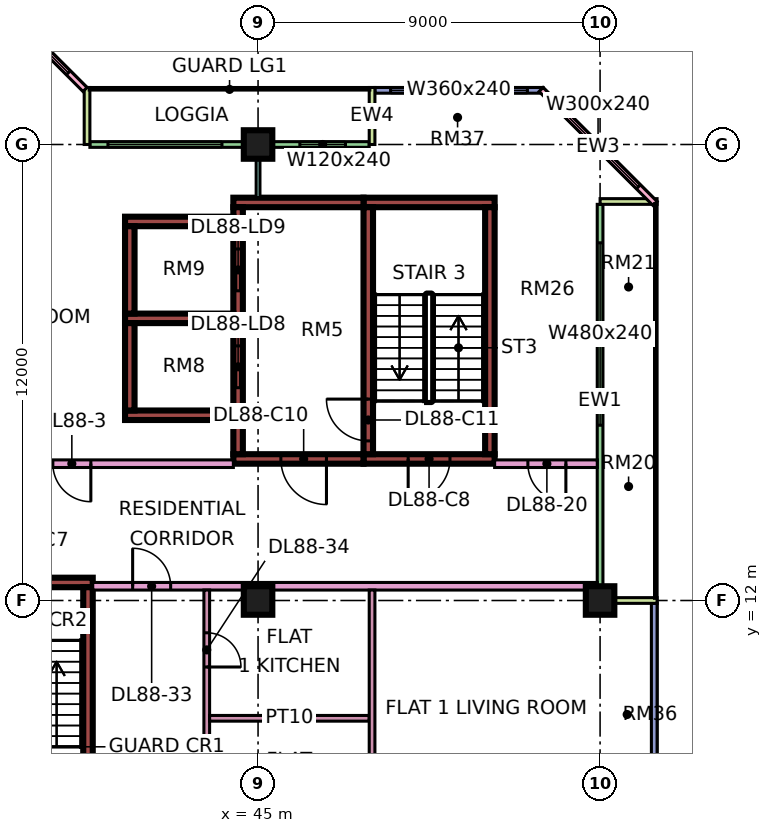
"""IFC4 building model, lengths in metres.
Left out: names, types, materials, properties, quantities, classifications, styles, units other than length and angle.
Written with IfcOpenShell. Run it as: python <this file> out.ifc"""

import sys

from ifc_helpers import new_model, si_unit, direction, frame, frame_2d, origin, origin_2d, place, context, subcontext, project, spatial, rectangle, extrude, element, fill, save


model = new_model("IFC4")
c1 = context("Model", 3, precision=1e-05, world=origin(), true_north=direction((0.0, 1.0)))
c2 = subcontext(c1, "Body", "Model", "MODEL_VIEW")
j1 = project(units=[si_unit("LENGTHUNIT", "METRE"), si_unit("PLANEANGLEUNIT", "RADIAN")], contexts=[c1])
p1 = place(None, origin())
s1 = spatial("IfcSite", under=j1, at=p1, CompositionType="ELEMENT")
p2 = place(p1, origin())
s2 = spatial("IfcBuilding", under=s1, at=p2, CompositionType="ELEMENT")
p3 = place(p2, frame((0.0, 0.0, 376.4)))
s3 = spatial("IfcBuildingStorey", under=s2, at=p3, CompositionType="ELEMENT", Elevation=376.4)
for number, where, z_axis, x_axis in (
    (1, (45.0, 12.0, 0.0), (0.0, 0.0, 1.0), (1.0, 0.0, 0.0)),
    (2, (45.0, 24.0, 0.0), (0.0, 0.0, 1.0), (1.0, 0.0, 0.0)),
    (3, (54.0, 12.0, 0.0), (0.0, 0.0, 1.0), (1.0, 0.0, 0.0)),
):
    element("IfcColumn", number, at=place(p3, frame(where, z_axis=z_axis, x_axis=x_axis)), inside=s3, PredefinedType="COLUMN", context=c2, shape_type="SweptSolid", body=[
        extrude(rectangle(XDim=0.75, YDim=0.75, at=origin_2d()), origin(), (0.0, 0.0, 1.0), 3.75),
    ])
p4 = place(p3, frame((36.375, 12.475, 0.0), z_axis=(0.0, 0.0, 1.0), x_axis=(1.0, 0.0, 0.0)))
e4 = element("IfcWall", 4, at=p4, inside=s3, PredefinedType="SHEAR", context=c2, shape_type="SweptSolid", body=[
    extrude(rectangle(XDim=4.275, YDim=0.25, at=frame_2d((2.137, 0.0))), origin(), (0.0, 0.0, 1.0), 3.75),
])
p5 = place(p4, frame((2.0, 0.0, 0.0)))
e5 = element("IfcOpeningElement", 5, at=p5, cuts=e4, PredefinedType="OPENING", context=c2, shape_type="SweptSolid", body=[
    extrude(rectangle(XDim=1.1, YDim=2.2, at=frame_2d((0.55, 1.1))), frame((0.0, 0.135, 0.0), z_axis=(0.0, -1.0, 0.0), x_axis=(1.0, 0.0, 0.0)), (0.0, 0.0, 1.0), 0.27),
])
p6 = place(p3, frame((40.525, 5.85, 0.0), z_axis=(0.0, 0.0, 1.0), x_axis=(0.0, 1.0, 0.0)))
e6 = element("IfcWall", 6, at=p6, inside=s3, PredefinedType="SHEAR", context=c2, shape_type="SweptSolid", body=[
    extrude(rectangle(XDim=6.5, YDim=0.25, at=frame_2d((3.25, 0.0))), origin(), (0.0, 0.0, 1.0), 3.75),
])
p7 = place(p3, frame((47.775, 15.725, 0.0), z_axis=(0.0, 0.0, 1.0), x_axis=(1.0, 0.0, 0.0)))
e7 = element("IfcWall", 7, at=p7, inside=s3, PredefinedType="SHEAR", context=c2, shape_type="SweptSolid", body=[
    extrude(rectangle(XDim=3.45, YDim=0.25, at=frame_2d((1.725, 0.0))), origin(), (0.0, 0.0, 1.0), 3.75),
])
p8 = place(p7, frame((1.175, 0.0, 0.0)))
e8 = element("IfcOpeningElement", 8, at=p8, cuts=e7, PredefinedType="OPENING", context=c2, shape_type="SweptSolid", body=[
    extrude(rectangle(XDim=1.1, YDim=2.2, at=frame_2d((0.55, 1.1))), frame((0.0, 0.135, 0.0), z_axis=(0.0, -1.0, 0.0), x_axis=(1.0, 0.0, 0.0)), (0.0, 0.0, 1.0), 0.27),
])
p9 = place(p3, frame((47.775, 22.475, 0.0), z_axis=(0.0, 0.0, 1.0), x_axis=(1.0, 0.0, 0.0)))
e9 = element("IfcWall", 9, at=p9, inside=s3, PredefinedType="SHEAR", context=c2, shape_type="SweptSolid", body=[
    extrude(rectangle(XDim=3.45, YDim=0.25, at=frame_2d((1.725, 0.0))), origin(), (0.0, 0.0, 1.0), 3.75),
])
p10 = place(p3, frame((47.9, 15.85, 0.0), z_axis=(0.0, 0.0, 1.0), x_axis=(0.0, 1.0, 0.0)))
e10 = element("IfcWall", 10, at=p10, inside=s3, PredefinedType="SHEAR", context=c2, shape_type="SweptSolid", body=[
    extrude(rectangle(XDim=6.5, YDim=0.25, at=frame_2d((3.25, 0.0))), origin(), (0.0, 0.0, 1.0), 3.75),
])
p11 = place(p10, frame((0.35, 0.0, 0.0)))
e11 = element("IfcOpeningElement", 11, at=p11, cuts=e10, PredefinedType="OPENING", context=c2, shape_type="SweptSolid", body=[
    extrude(rectangle(XDim=1.1, YDim=2.2, at=frame_2d((0.55, 1.1))), frame((0.0, 0.135, 0.0), z_axis=(0.0, -1.0, 0.0), x_axis=(1.0, 0.0, 0.0)), (0.0, 0.0, 1.0), 0.27),
])
p12 = place(p3, frame((51.1, 15.85, 0.0), z_axis=(0.0, 0.0, 1.0), x_axis=(0.0, 1.0, 0.0)))
e12 = element("IfcWall", 12, at=p12, inside=s3, PredefinedType="SHEAR", context=c2, shape_type="SweptSolid", body=[
    extrude(rectangle(XDim=6.5, YDim=0.25, at=frame_2d((3.25, 0.0))), origin(), (0.0, 0.0, 1.0), 3.75),
])
p13 = place(p3, frame((44.35, 15.725, 0.0), z_axis=(0.0, 0.0, 1.0), x_axis=(1.0, 0.0, 0.0)))
e13 = element("IfcWall", 13, at=p13, inside=s3, PredefinedType="SHEAR", context=c2, shape_type="SweptSolid", body=[
    extrude(rectangle(XDim=3.425, YDim=0.25, at=frame_2d((1.712, 0.0))), origin(), (0.0, 0.0, 1.0), 3.75),
])
p14 = place(p13, frame((1.25, 0.0, 0.0)))
e14 = element("IfcOpeningElement", 14, at=p14, cuts=e13, PredefinedType="OPENING", context=c2, shape_type="SweptSolid", body=[
    extrude(rectangle(XDim=1.2, YDim=2.2, at=frame_2d((0.6, 1.1))), frame((0.0, 0.135, 0.0), z_axis=(0.0, -1.0, 0.0), x_axis=(1.0, 0.0, 0.0)), (0.0, 0.0, 1.0), 0.27),
])
p15 = place(p3, frame((44.35, 22.475, 0.0), z_axis=(0.0, 0.0, 1.0), x_axis=(1.0, 0.0, 0.0)))
e15 = element("IfcWall", 15, at=p15, inside=s3, PredefinedType="SHEAR", context=c2, shape_type="SweptSolid", body=[
    extrude(rectangle(XDim=3.425, YDim=0.25, at=frame_2d((1.712, 0.0))), origin(), (0.0, 0.0, 1.0), 3.75),
])
p16 = place(p3, frame((44.475, 15.85, 0.0), z_axis=(0.0, 0.0, 1.0), x_axis=(0.0, 1.0, 0.0)))
e16 = element("IfcWall", 16, at=p16, inside=s3, PredefinedType="SHEAR", context=c2, shape_type="SweptSolid", body=[
    extrude(rectangle(XDim=6.5, YDim=0.25, at=frame_2d((3.25, 0.0))), origin(), (0.0, 0.0, 1.0), 3.75),
])
p17 = place(p16, frame((1.75, 0.0, 0.0)))
e17 = element("IfcOpeningElement", 17, at=p17, cuts=e16, PredefinedType="OPENING", context=c2, shape_type="SweptSolid", body=[
    extrude(rectangle(XDim=1.1, YDim=2.2, at=frame_2d((0.55, 1.1))), frame((0.0, 0.135, 0.0), z_axis=(0.0, -1.0, 0.0), x_axis=(1.0, 0.0, 0.0)), (0.0, 0.0, 1.0), 0.27),
])
p18 = place(p16, frame((4.3, 0.0, 0.0)))
e18 = element("IfcOpeningElement", 18, at=p18, cuts=e16, PredefinedType="OPENING", context=c2, shape_type="SweptSolid", body=[
    extrude(rectangle(XDim=1.1, YDim=2.2, at=frame_2d((0.55, 1.1))), frame((0.0, 0.135, 0.0), z_axis=(0.0, -1.0, 0.0), x_axis=(1.0, 0.0, 0.0)), (0.0, 0.0, 1.0), 0.27),
])
for number, where, z_axis, x_axis in (
    (19, (41.5, 16.875, 0.0), (0.0, 0.0, 1.0), (1.0, 0.0, 0.0)),
    (20, (41.5, 19.425, 0.0), (0.0, 0.0, 1.0), (1.0, 0.0, 0.0)),
    (21, (41.5, 21.975, 0.0), (0.0, 0.0, 1.0), (1.0, 0.0, 0.0)),
):
    element("IfcWall", number, at=place(p3, frame(where, z_axis=z_axis, x_axis=x_axis)), inside=s3, PredefinedType="SHEAR", context=c2, shape_type="SweptSolid", body=[
        extrude(rectangle(XDim=2.85, YDim=0.25, at=frame_2d((1.425, 0.0))), origin(), (0.0, 0.0, 1.0), 3.75),
    ])
for number, where, z_axis, x_axis in (
    (22, (41.625, 17.0, 0.0), (0.0, 0.0, 1.0), (0.0, 1.0, 0.0)),
    (23, (41.625, 19.55, 0.0), (0.0, 0.0, 1.0), (0.0, 1.0, 0.0)),
):
    element("IfcWall", number, at=place(p3, frame(where, z_axis=z_axis, x_axis=x_axis)), inside=s3, PredefinedType="SHEAR", context=c2, shape_type="SweptSolid", body=[
        extrude(rectangle(XDim=2.3, YDim=0.25, at=frame_2d((1.15, 0.0))), origin(), (0.0, 0.0, 1.0), 3.75),
    ])
p19 = place(p3, frame((52.5, 25.425, 0.0), z_axis=(0.0, 0.0, 1.0), x_axis=(-1.0, 0.0, 0.0)))
e24 = element("IfcWall", 24, at=p19, inside=s3, PredefinedType="SOLIDWALL", context=c2, shape_type="SweptSolid", body=[
    extrude(rectangle(XDim=4.425, YDim=0.15, at=frame_2d((2.212, 0.0))), origin(), (0.0, 0.0, 1.0), 3.35),
])
p20 = place(p19, frame((0.413, 0.0, 0.45)))
e25 = element("IfcOpeningElement", 25, at=p20, cuts=e24, PredefinedType="OPENING", context=c2, shape_type="SweptSolid", body=[
    extrude(rectangle(XDim=3.6, YDim=2.4, at=frame_2d((1.8, 1.2))), frame((0.0, 0.085, 0.0), z_axis=(0.0, -1.0, 0.0), x_axis=(1.0, 0.0, 0.0)), (0.0, 0.0, 1.0), 0.17),
])
p21 = place(p3, frame((47.925, 24.0, 0.0), z_axis=(0.0, 0.0, 1.0), x_axis=(-1.0, 0.0, 0.0)))
e26 = element("IfcWall", 26, at=p21, inside=s3, PredefinedType="SOLIDWALL", context=c2, shape_type="SweptSolid", body=[
    extrude(rectangle(XDim=7.35, YDim=0.15, at=frame_2d((3.675, 0.0))), origin(), (0.0, 0.0, 1.0), 3.35),
])
p22 = place(p21, frame((0.625, 0.0, 0.45)))
e27 = element("IfcOpeningElement", 27, at=p22, cuts=e26, PredefinedType="OPENING", context=c2, shape_type="SweptSolid", body=[
    extrude(rectangle(XDim=1.2, YDim=2.4, at=frame_2d((0.6, 1.2))), frame((0.0, 0.085, 0.0), z_axis=(0.0, -1.0, 0.0), x_axis=(1.0, 0.0, 0.0)), (0.0, 0.0, 1.0), 0.17),
])
p23 = place(p21, frame((3.875, 0.0, 0.45)))
e28 = element("IfcOpeningElement", 28, at=p23, cuts=e26, PredefinedType="OPENING", context=c2, shape_type="SweptSolid", body=[
    extrude(rectangle(XDim=3.0, YDim=2.4, at=frame_2d((1.5, 1.2))), frame((0.0, 0.085, 0.0), z_axis=(0.0, -1.0, 0.0), x_axis=(1.0, 0.0, 0.0)), (0.0, 0.0, 1.0), 0.17),
])
for number, where, z_axis, x_axis in (
    (29, (48.0, 25.5, 0.0), (0.0, 0.0, 1.0), (0.0, -1.0, 0.0)),
    (30, (40.5, 25.5, 0.0), (0.0, 0.0, 1.0), (0.0, -1.0, 0.0)),
):
    element("IfcWall", number, at=place(p3, frame(where, z_axis=z_axis, x_axis=x_axis)), inside=s3, PredefinedType="SOLIDWALL", context=c2, shape_type="SweptSolid", body=[
        extrude(rectangle(XDim=1.5, YDim=0.15, at=frame_2d((0.75, 0.0))), origin(), (0.0, 0.0, 1.0), 3.35),
    ])
p24 = place(p3, frame((40.447, 25.447, 0.0), z_axis=(0.0, 0.0, 1.0), x_axis=(-0.707106781187, 0.707106781187, 0.0)))
e31 = element("IfcWall", 31, at=p24, inside=s3, PredefinedType="SOLIDWALL", context=c2, shape_type="SweptSolid", body=[
    extrude(rectangle(XDim=4.243, YDim=0.15, at=frame_2d((2.121, 0.0))), origin(), (0.0, 0.0, 1.0), 3.35),
])
p25 = place(p24, frame((0.621, 0.0, 0.45)))
e32 = element("IfcOpeningElement", 32, at=p25, cuts=e31, PredefinedType="OPENING", context=c2, shape_type="SweptSolid", body=[
    extrude(rectangle(XDim=3.0, YDim=2.4, at=frame_2d((1.5, 1.2))), frame((0.0, 0.085, 0.0), z_axis=(0.0, -1.0, 0.0), x_axis=(1.0, 0.0, 0.0)), (0.0, 0.0, 1.0), 0.17),
])
p26 = place(p3, frame((55.425, 1.5, 0.0), z_axis=(0.0, 0.0, 1.0), x_axis=(0.0, 1.0, 0.0)))
e33 = element("IfcWall", 33, at=p26, inside=s3, PredefinedType="SOLIDWALL", context=c2, shape_type="SweptSolid", body=[
    extrude(rectangle(XDim=10.425, YDim=0.15, at=frame_2d((5.212, 0.0))), origin(), (0.0, 0.0, 1.0), 3.35),
])
p27 = place(p26, frame((0.4, 0.0, 0.45)))
e34 = element("IfcOpeningElement", 34, at=p27, cuts=e33, PredefinedType="OPENING", context=c2, shape_type="SweptSolid", body=[
    extrude(rectangle(XDim=2.4, YDim=2.4, at=frame_2d((1.2, 1.2))), frame((0.0, 0.085, 0.0), z_axis=(0.0, -1.0, 0.0), x_axis=(1.0, 0.0, 0.0)), (0.0, 0.0, 1.0), 0.17),
])
p28 = place(p3, frame((54.0, 12.075, 0.0), z_axis=(0.0, 0.0, 1.0), x_axis=(0.0, 1.0, 0.0)))
e35 = element("IfcWall", 35, at=p28, inside=s3, PredefinedType="SOLIDWALL", context=c2, shape_type="SweptSolid", body=[
    extrude(rectangle(XDim=10.35, YDim=0.15, at=frame_2d((5.175, 0.0))), origin(), (0.0, 0.0, 1.0), 3.35),
])
p29 = place(p28, frame((4.538, 0.0, 0.45)))
e36 = element("IfcOpeningElement", 36, at=p29, cuts=e35, PredefinedType="OPENING", context=c2, shape_type="SweptSolid", body=[
    extrude(rectangle(XDim=4.8, YDim=2.4, at=frame_2d((2.4, 1.2))), frame((0.0, 0.085, 0.0), z_axis=(0.0, -1.0, 0.0), x_axis=(1.0, 0.0, 0.0)), (0.0, 0.0, 1.0), 0.17),
])
for number, where, z_axis, x_axis in (
    (37, (55.5, 12.0, 0.0), (0.0, 0.0, 1.0), (-1.0, 0.0, 0.0)),
    (38, (55.5, 22.5, 0.0), (0.0, 0.0, 1.0), (-1.0, 0.0, 0.0)),
):
    element("IfcWall", number, at=place(p3, frame(where, z_axis=z_axis, x_axis=x_axis)), inside=s3, PredefinedType="SOLIDWALL", context=c2, shape_type="SweptSolid", body=[
        extrude(rectangle(XDim=1.5, YDim=0.15, at=frame_2d((0.75, 0.0))), origin(), (0.0, 0.0, 1.0), 3.35),
    ])
p30 = place(p3, frame((55.447, 22.447, 0.0), z_axis=(0.0, 0.0, 1.0), x_axis=(-0.707106781187, 0.707106781187, 0.0)))
e39 = element("IfcWall", 39, at=p30, inside=s3, PredefinedType="SOLIDWALL", context=c2, shape_type="SweptSolid", body=[
    extrude(rectangle(XDim=4.243, YDim=0.15, at=frame_2d((2.121, 0.0))), origin(), (0.0, 0.0, 1.0), 3.35),
])
p31 = place(p30, frame((0.621, 0.0, 0.45)))
e40 = element("IfcOpeningElement", 40, at=p31, cuts=e39, PredefinedType="OPENING", context=c2, shape_type="SweptSolid", body=[
    extrude(rectangle(XDim=3.0, YDim=2.4, at=frame_2d((1.5, 1.2))), frame((0.0, 0.085, 0.0), z_axis=(0.0, -1.0, 0.0), x_axis=(1.0, 0.0, 0.0)), (0.0, 0.0, 1.0), 0.17),
])
p32 = place(p3, frame((34.0, 15.6, 0.0), z_axis=(0.0, 0.0, 1.0), x_axis=(1.0, 0.0, 0.0)))
e41 = element("IfcWall", 41, at=p32, inside=s3, PredefinedType="PARTITIONING", context=c2, shape_type="SweptSolid", body=[
    extrude(rectangle(XDim=10.35, YDim=0.2, at=frame_2d((5.175, 0.0))), origin(), (0.0, 0.0, 1.0), 3.35),
])
p33 = place(p32, frame((5.6, 0.0, 0.0)))
e42 = element("IfcOpeningElement", 42, at=p33, cuts=e41, PredefinedType="OPENING", context=c2, shape_type="SweptSolid", body=[
    extrude(rectangle(XDim=1.0, YDim=2.1, at=frame_2d((0.5, 1.05))), frame((0.0, 0.11, 0.0), z_axis=(0.0, -1.0, 0.0), x_axis=(1.0, 0.0, 0.0)), (0.0, 0.0, 1.0), 0.22),
])
p34 = place(p32, frame((0.45, 0.0, 0.0)))
e43 = element("IfcOpeningElement", 43, at=p34, cuts=e41, PredefinedType="OPENING", context=c2, shape_type="SweptSolid", body=[
    extrude(rectangle(XDim=1.2, YDim=2.1, at=frame_2d((0.6, 1.05))), frame((0.0, 0.11, 0.0), z_axis=(0.0, -1.0, 0.0), x_axis=(1.0, 0.0, 0.0)), (0.0, 0.0, 1.0), 0.22),
])
p35 = place(p3, frame((40.65, 12.375, 0.0), z_axis=(0.0, 0.0, 1.0), x_axis=(1.0, 0.0, 0.0)))
e44 = element("IfcWall", 44, at=p35, inside=s3, PredefinedType="PARTITIONING", context=c2, shape_type="SweptSolid", body=[
    extrude(rectangle(XDim=13.276, YDim=0.2, at=frame_2d((6.638, 0.0))), origin(), (0.0, 0.0, 1.0), 3.35),
])
p36 = place(p35, frame((1.05, 0.0, 0.0)))
e45 = element("IfcOpeningElement", 45, at=p36, cuts=e44, PredefinedType="OPENING", context=c2, shape_type="SweptSolid", body=[
    extrude(rectangle(XDim=1.0, YDim=2.1, at=frame_2d((0.5, 1.05))), frame((0.0, 0.11, 0.0), z_axis=(0.0, -1.0, 0.0), x_axis=(1.0, 0.0, 0.0)), (0.0, 0.0, 1.0), 0.22),
])
p37 = place(p3, frame((43.65, 5.975, 0.0), z_axis=(0.0, 0.0, 1.0), x_axis=(0.0, 1.0, 0.0)))
e46 = element("IfcWall", 46, at=p37, inside=s3, PredefinedType="PARTITIONING", context=c2, shape_type="SweptSolid", body=[
    extrude(rectangle(XDim=6.3, YDim=0.15, at=frame_2d((3.15, 0.0))), origin(), (0.0, 0.0, 1.0), 3.35),
])
p38 = place(p37, frame((4.275, 0.0, 0.0)))
e47 = element("IfcOpeningElement", 47, at=p38, cuts=e46, PredefinedType="OPENING", context=c2, shape_type="SweptSolid", body=[
    extrude(rectangle(XDim=0.9, YDim=2.1, at=frame_2d((0.45, 1.05))), frame((0.0, 0.085, 0.0), z_axis=(0.0, -1.0, 0.0), x_axis=(1.0, 0.0, 0.0)), (0.0, 0.0, 1.0), 0.17),
])
p39 = place(p3, frame((43.725, 8.9, 0.0), z_axis=(0.0, 0.0, 1.0), x_axis=(1.0, 0.0, 0.0)))
e48 = element("IfcWall", 48, at=p39, inside=s3, PredefinedType="PARTITIONING", context=c2, shape_type="SweptSolid", body=[
    extrude(rectangle(XDim=4.2, YDim=0.15, at=frame_2d((2.1, 0.0))), origin(), (0.0, 0.0, 1.0), 3.35),
])
p40 = place(p3, frame((45.0, 22.6, 0.0), z_axis=(0.0, 0.0, 1.0), x_axis=(0.0, 1.0, 0.0)))
e49 = element("IfcWall", 49, at=p40, inside=s3, PredefinedType="PARTITIONING", context=c2, shape_type="SweptSolid", body=[
    extrude(rectangle(XDim=1.326, YDim=0.1, at=frame_2d((0.663, 0.0))), origin(), (0.0, 0.0, 1.0), 3.35),
])
p41 = place(p3, frame((48.0, 5.975, 0.0), z_axis=(0.0, 0.0, 1.0), x_axis=(0.0, 1.0, 0.0)))
e50 = element("IfcWall", 50, at=p41, inside=s3, PredefinedType="PARTITIONING", context=c2, shape_type="SweptSolid", body=[
    extrude(rectangle(XDim=6.3, YDim=0.15, at=frame_2d((3.15, 0.0))), origin(), (0.0, 0.0, 1.0), 3.35),
])
p42 = place(p3, frame((51.225, 15.6, 0.0), z_axis=(0.0, 0.0, 1.0), x_axis=(1.0, 0.0, 0.0)))
e51 = element("IfcWall", 51, at=p42, inside=s3, PredefinedType="PARTITIONING", context=c2, shape_type="SweptSolid", body=[
    extrude(rectangle(XDim=2.701, YDim=0.2, at=frame_2d((1.351, 0.0))), origin(), (0.0, 0.0, 1.0), 3.35),
])
p43 = place(p42, frame((0.875, 0.0, 0.0)))
e52 = element("IfcOpeningElement", 52, at=p43, cuts=e51, PredefinedType="OPENING", context=c2, shape_type="SweptSolid", body=[
    extrude(rectangle(XDim=1.0, YDim=2.1, at=frame_2d((0.5, 1.05))), frame((0.0, 0.11, 0.0), z_axis=(0.0, -1.0, 0.0), x_axis=(1.0, 0.0, 0.0)), (0.0, 0.0, 1.0), 0.22),
])
p44 = place(p20, origin())
e53 = element("IfcWindow", 53, at=p44, inside=s3, PartitioningType="SINGLE_PANEL", PredefinedType="WINDOW", context=c2, shape_type="SweptSolid", body=[
    extrude(rectangle(XDim=3.6, YDim=2.4, at=frame_2d((1.8, 1.2))), frame((0.0, 0.03, 0.0), z_axis=(0.0, -1.0, 0.0), x_axis=(1.0, 0.0, 0.0)), (0.0, 0.0, 1.0), 0.06),
])
fill(e25, e53)
p45 = place(p22, origin())
e54 = element("IfcWindow", 54, at=p45, inside=s3, PartitioningType="SINGLE_PANEL", PredefinedType="WINDOW", context=c2, shape_type="SweptSolid", body=[
    extrude(rectangle(XDim=1.2, YDim=2.4, at=frame_2d((0.6, 1.2))), frame((0.0, 0.03, 0.0), z_axis=(0.0, -1.0, 0.0), x_axis=(1.0, 0.0, 0.0)), (0.0, 0.0, 1.0), 0.06),
])
fill(e27, e54)
p46 = place(p23, origin())
e55 = element("IfcWindow", 55, at=p46, inside=s3, PartitioningType="SINGLE_PANEL", PredefinedType="WINDOW", context=c2, shape_type="SweptSolid", body=[
    extrude(rectangle(XDim=3.0, YDim=2.4, at=frame_2d((1.5, 1.2))), frame((0.0, 0.03, 0.0), z_axis=(0.0, -1.0, 0.0), x_axis=(1.0, 0.0, 0.0)), (0.0, 0.0, 1.0), 0.06),
])
fill(e28, e55)
p47 = place(p25, origin())
e56 = element("IfcWindow", 56, at=p47, inside=s3, PartitioningType="SINGLE_PANEL", PredefinedType="WINDOW", context=c2, shape_type="SweptSolid", body=[
    extrude(rectangle(XDim=3.0, YDim=2.4, at=frame_2d((1.5, 1.2))), frame((0.0, 0.03, 0.0), z_axis=(0.0, -1.0, 0.0), x_axis=(1.0, 0.0, 0.0)), (0.0, 0.0, 1.0), 0.06),
])
fill(e32, e56)
p48 = place(p29, origin())
e57 = element("IfcWindow", 57, at=p48, inside=s3, PartitioningType="SINGLE_PANEL", PredefinedType="WINDOW", context=c2, shape_type="SweptSolid", body=[
    extrude(rectangle(XDim=4.8, YDim=2.4, at=frame_2d((2.4, 1.2))), frame((0.0, 0.03, 0.0), z_axis=(0.0, -1.0, 0.0), x_axis=(1.0, 0.0, 0.0)), (0.0, 0.0, 1.0), 0.06),
])
fill(e36, e57)
p49 = place(p31, origin())
e58 = element("IfcWindow", 58, at=p49, inside=s3, PartitioningType="SINGLE_PANEL", PredefinedType="WINDOW", context=c2, shape_type="SweptSolid", body=[
    extrude(rectangle(XDim=3.0, YDim=2.4, at=frame_2d((1.5, 1.2))), frame((0.0, 0.03, 0.0), z_axis=(0.0, -1.0, 0.0), x_axis=(1.0, 0.0, 0.0)), (0.0, 0.0, 1.0), 0.06),
])
fill(e40, e58)
p50 = place(p8, frame((1.1, 0.0, 0.0), z_axis=(0.0, 0.0, 1.0), x_axis=(-1.0, 0.0, 0.0)))
e59 = element("IfcDoor", 59, at=p50, inside=s3, OperationType="SINGLE_SWING_LEFT", PredefinedType="DOOR", context=c2, shape_type="SweptSolid", body=[
    extrude(rectangle(XDim=1.1, YDim=2.2, at=frame_2d((0.55, 1.1))), frame((0.0, 0.025, 0.0), z_axis=(0.0, -1.0, 0.0), x_axis=(1.0, 0.0, 0.0)), (0.0, 0.0, 1.0), 0.05),
])
fill(e8, e59)
p51 = place(p14, origin())
e60 = element("IfcDoor", 60, at=p51, inside=s3, OperationType="SINGLE_SWING_RIGHT", PredefinedType="DOOR", context=c2, shape_type="SweptSolid", body=[
    extrude(rectangle(XDim=1.2, YDim=2.2, at=frame_2d((0.6, 1.1))), frame((0.0, 0.025, 0.0), z_axis=(0.0, -1.0, 0.0), x_axis=(1.0, 0.0, 0.0)), (0.0, 0.0, 1.0), 0.05),
])
fill(e14, e60)
p52 = place(p11, frame((1.1, 0.0, 0.0), z_axis=(0.0, 0.0, 1.0), x_axis=(-1.0, 0.0, 0.0)))
e61 = element("IfcDoor", 61, at=p52, inside=s3, OperationType="SINGLE_SWING_RIGHT", PredefinedType="DOOR", context=c2, shape_type="SweptSolid", body=[
    extrude(rectangle(XDim=1.1, YDim=2.2, at=frame_2d((0.55, 1.1))), frame((0.0, 0.025, 0.0), z_axis=(0.0, -1.0, 0.0), x_axis=(1.0, 0.0, 0.0)), (0.0, 0.0, 1.0), 0.05),
])
fill(e11, e61)
p53 = place(p17, origin())
e62 = element("IfcDoor", 62, at=p53, inside=s3, OperationType="DOUBLE_DOOR_SLIDING", PredefinedType="DOOR", context=c2, shape_type="SweptSolid", body=[
    extrude(rectangle(XDim=1.1, YDim=2.2, at=frame_2d((0.55, 1.1))), frame((0.0, 0.025, 0.0), z_axis=(0.0, -1.0, 0.0), x_axis=(1.0, 0.0, 0.0)), (0.0, 0.0, 1.0), 0.05),
])
fill(e17, e62)
p54 = place(p18, origin())
e63 = element("IfcDoor", 63, at=p54, inside=s3, OperationType="DOUBLE_DOOR_SLIDING", PredefinedType="DOOR", context=c2, shape_type="SweptSolid", body=[
    extrude(rectangle(XDim=1.1, YDim=2.2, at=frame_2d((0.55, 1.1))), frame((0.0, 0.025, 0.0), z_axis=(0.0, -1.0, 0.0), x_axis=(1.0, 0.0, 0.0)), (0.0, 0.0, 1.0), 0.05),
])
fill(e18, e63)
p55 = place(p33, origin())
e64 = element("IfcDoor", 64, at=p55, inside=s3, OperationType="SINGLE_SWING_RIGHT", PredefinedType="DOOR", context=c2, shape_type="SweptSolid", body=[
    extrude(rectangle(XDim=1.0, YDim=2.1, at=frame_2d((0.5, 1.05))), frame((0.0, 0.025, 0.0), z_axis=(0.0, -1.0, 0.0), x_axis=(1.0, 0.0, 0.0)), (0.0, 0.0, 1.0), 0.05),
])
fill(e42, e64)
p56 = place(p43, origin())
e65 = element("IfcDoor", 65, at=p56, inside=s3, OperationType="SINGLE_SWING_RIGHT", PredefinedType="DOOR", context=c2, shape_type="SweptSolid", body=[
    extrude(rectangle(XDim=1.0, YDim=2.1, at=frame_2d((0.5, 1.05))), frame((0.0, 0.025, 0.0), z_axis=(0.0, -1.0, 0.0), x_axis=(1.0, 0.0, 0.0)), (0.0, 0.0, 1.0), 0.05),
])
fill(e52, e65)
p57 = place(p36, origin())
e66 = element("IfcDoor", 66, at=p57, inside=s3, OperationType="SINGLE_SWING_LEFT", PredefinedType="DOOR", context=c2, shape_type="SweptSolid", body=[
    extrude(rectangle(XDim=1.0, YDim=2.1, at=frame_2d((0.5, 1.05))), frame((0.0, 0.025, 0.0), z_axis=(0.0, -1.0, 0.0), x_axis=(1.0, 0.0, 0.0)), (0.0, 0.0, 1.0), 0.05),
])
fill(e45, e66)
p58 = place(p38, frame((0.9, 0.0, 0.0), z_axis=(0.0, 0.0, 1.0), x_axis=(-1.0, 0.0, 0.0)))
e67 = element("IfcDoor", 67, at=p58, inside=s3, OperationType="SINGLE_SWING_LEFT", PredefinedType="DOOR", context=c2, shape_type="SweptSolid", body=[
    extrude(rectangle(XDim=0.9, YDim=2.1, at=frame_2d((0.45, 1.05))), frame((0.0, 0.025, 0.0), z_axis=(0.0, -1.0, 0.0), x_axis=(1.0, 0.0, 0.0)), (0.0, 0.0, 1.0), 0.05),
])
fill(e47, e67)
save(model, sys.argv[1])
